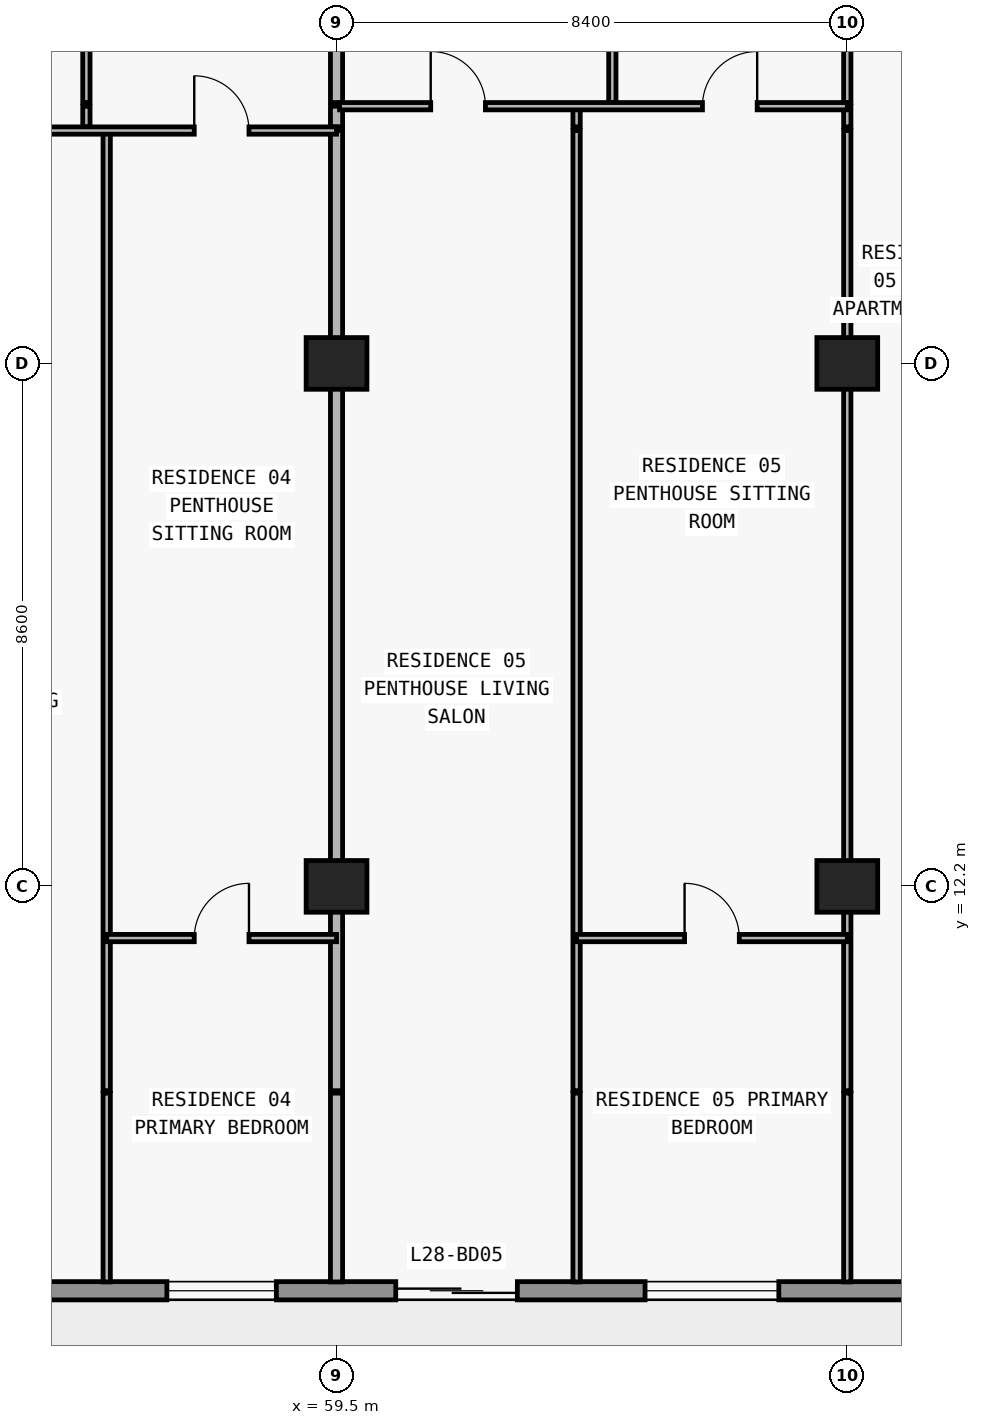
"""IFC4 building model, lengths in metres.
Left out: names, types, materials, properties, quantities, classifications, styles, units other than length and angle.
Written with IfcOpenShell. Run it as: python <this file> out.ifc"""

import sys

from ifc_helpers import new_model, si_unit, direction, frame, frame_2d, origin, origin_2d, place, context, subcontext, project, spatial, rectangle, extrude, element, fill, save


model = new_model("IFC4")
c1 = context("Model", 3, precision=1e-05, world=origin(), true_north=direction((0.0, 1.0)))
c2 = subcontext(c1, "Body", "Model", "MODEL_VIEW")
j1 = project(units=[si_unit("LENGTHUNIT", "METRE"), si_unit("PLANEANGLEUNIT", "RADIAN")], contexts=[c1])
p1 = place(None, origin())
s1 = spatial("IfcSite", under=j1, at=p1, CompositionType="ELEMENT")
p2 = place(p1, origin())
s2 = spatial("IfcBuilding", under=s1, at=p2, CompositionType="ELEMENT")
p3 = place(p2, frame((0.0, 0.0, 105.9)))
s3 = spatial("IfcBuildingStorey", under=s2, at=p3, CompositionType="ELEMENT", Elevation=105.9)
for number, where, z_axis, x_axis in (
    (1, (59.5, 12.2, 0.0), (0.0, 0.0, 1.0), (1.0, 0.0, 0.0)),
    (2, (67.9, 12.2, 0.0), (0.0, 0.0, 1.0), (1.0, 0.0, 0.0)),
    (3, (59.5, 20.8, 0.0), (0.0, 0.0, 1.0), (1.0, 0.0, 0.0)),
    (4, (67.9, 20.8, 0.0), (0.0, 0.0, 1.0), (1.0, 0.0, 0.0)),
):
    element("IfcColumn", number, at=place(p3, frame(where, z_axis=z_axis, x_axis=x_axis)), inside=s3, PredefinedType="COLUMN", context=c2, shape_type="SweptSolid", body=[
        extrude(rectangle(XDim=1.0, YDim=0.85, at=origin_2d()), origin(), (0.0, 0.0, 1.0), 3.05),
    ])
p4 = place(p3, frame((70.1, 5.55, 0.0), z_axis=(0.0, 0.0, 1.0), x_axis=(-1.0, 0.0, 0.0)))
e5 = element("IfcWall", 5, at=p4, inside=s3, PredefinedType="STANDARD", context=c2, shape_type="SweptSolid", body=[
    extrude(rectangle(XDim=62.4, YDim=0.3, at=frame_2d((31.2, 0.0))), origin(), (0.0, 0.0, 1.0), 3.05),
])
p5 = place(p4, frame((57.226, 0.0, 0.0)))
e6 = element("IfcOpeningElement", 6, at=p5, cuts=e5, PredefinedType="OPENING", context=c2, shape_type="SweptSolid", body=[
    extrude(rectangle(XDim=2.0, YDim=2.3, at=frame_2d((1.0, 1.15))), frame((0.0, 0.16, 0.0), z_axis=(0.0, -1.0, 0.0), x_axis=(1.0, 0.0, 0.0)), (0.0, 0.0, 1.0), 0.32),
])
p6 = place(p4, frame((52.926, 0.0, 0.85)))
e7 = element("IfcOpeningElement", 7, at=p6, cuts=e5, PredefinedType="OPENING", context=c2, shape_type="SweptSolid", body=[
    extrude(rectangle(XDim=2.2, YDim=1.55, at=frame_2d((1.1, 0.775))), frame((0.0, 0.16, 0.0), z_axis=(0.0, -1.0, 0.0), x_axis=(1.0, 0.0, 0.0)), (0.0, 0.0, 1.0), 0.32),
])
p7 = place(p4, frame((48.49, 0.0, 0.0)))
e8 = element("IfcOpeningElement", 8, at=p7, cuts=e5, PredefinedType="OPENING", context=c2, shape_type="SweptSolid", body=[
    extrude(rectangle(XDim=2.0, YDim=2.3, at=frame_2d((1.0, 1.15))), frame((0.0, 0.16, 0.0), z_axis=(0.0, -1.0, 0.0), x_axis=(1.0, 0.0, 0.0)), (0.0, 0.0, 1.0), 0.32),
])
p8 = place(p4, frame((44.39, 0.0, 0.85)))
e9 = element("IfcOpeningElement", 9, at=p8, cuts=e5, PredefinedType="OPENING", context=c2, shape_type="SweptSolid", body=[
    extrude(rectangle(XDim=1.8, YDim=1.55, at=frame_2d((0.9, 0.775))), frame((0.0, 0.16, 0.0), z_axis=(0.0, -1.0, 0.0), x_axis=(1.0, 0.0, 0.0)), (0.0, 0.0, 1.0), 0.32),
])
p9 = place(p4, frame((40.49, 0.0, 0.0)))
e10 = element("IfcOpeningElement", 10, at=p9, cuts=e5, PredefinedType="OPENING", context=c2, shape_type="SweptSolid", body=[
    extrude(rectangle(XDim=2.0, YDim=2.3, at=frame_2d((1.0, 1.15))), frame((0.0, 0.16, 0.0), z_axis=(0.0, -1.0, 0.0), x_axis=(1.0, 0.0, 0.0)), (0.0, 0.0, 1.0), 0.32),
])
p10 = place(p4, frame((35.81, 0.0, 0.65)))
e11 = element("IfcOpeningElement", 11, at=p10, cuts=e5, PredefinedType="OPENING", context=c2, shape_type="SweptSolid", body=[
    extrude(rectangle(XDim=2.6, YDim=1.85, at=frame_2d((1.3, 0.925))), frame((0.0, 0.16, 0.0), z_axis=(0.0, -1.0, 0.0), x_axis=(1.0, 0.0, 0.0)), (0.0, 0.0, 1.0), 0.32),
])
p11 = place(p4, frame((30.1, 0.0, 0.85)))
e12 = element("IfcOpeningElement", 12, at=p11, cuts=e5, PredefinedType="OPENING", context=c2, shape_type="SweptSolid", body=[
    extrude(rectangle(XDim=2.2, YDim=1.55, at=frame_2d((1.1, 0.775))), frame((0.0, 0.16, 0.0), z_axis=(0.0, -1.0, 0.0), x_axis=(1.0, 0.0, 0.0)), (0.0, 0.0, 1.0), 0.32),
])
p12 = place(p4, frame((22.1, 0.0, 0.85)))
e13 = element("IfcOpeningElement", 13, at=p12, cuts=e5, PredefinedType="OPENING", context=c2, shape_type="SweptSolid", body=[
    extrude(rectangle(XDim=2.2, YDim=1.55, at=frame_2d((1.1, 0.775))), frame((0.0, 0.16, 0.0), z_axis=(0.0, -1.0, 0.0), x_axis=(1.0, 0.0, 0.0)), (0.0, 0.0, 1.0), 0.32),
])
p13 = place(p4, frame((15.69, 0.0, 0.0)))
e14 = element("IfcOpeningElement", 14, at=p13, cuts=e5, PredefinedType="OPENING", context=c2, shape_type="SweptSolid", body=[
    extrude(rectangle(XDim=2.0, YDim=2.3, at=frame_2d((1.0, 1.15))), frame((0.0, 0.16, 0.0), z_axis=(0.0, -1.0, 0.0), x_axis=(1.0, 0.0, 0.0)), (0.0, 0.0, 1.0), 0.32),
])
p14 = place(p4, frame((11.59, 0.0, 0.85)))
e15 = element("IfcOpeningElement", 15, at=p14, cuts=e5, PredefinedType="OPENING", context=c2, shape_type="SweptSolid", body=[
    extrude(rectangle(XDim=1.8, YDim=1.55, at=frame_2d((0.9, 0.775))), frame((0.0, 0.16, 0.0), z_axis=(0.0, -1.0, 0.0), x_axis=(1.0, 0.0, 0.0)), (0.0, 0.0, 1.0), 0.32),
])
p15 = place(p4, frame((7.626, 0.0, 0.0)))
e16 = element("IfcOpeningElement", 16, at=p15, cuts=e5, PredefinedType="OPENING", context=c2, shape_type="SweptSolid", body=[
    extrude(rectangle(XDim=2.0, YDim=2.3, at=frame_2d((1.0, 1.15))), frame((0.0, 0.16, 0.0), z_axis=(0.0, -1.0, 0.0), x_axis=(1.0, 0.0, 0.0)), (0.0, 0.0, 1.0), 0.32),
])
p16 = place(p4, frame((3.326, 0.0, 0.85)))
e17 = element("IfcOpeningElement", 17, at=p16, cuts=e5, PredefinedType="OPENING", context=c2, shape_type="SweptSolid", body=[
    extrude(rectangle(XDim=2.2, YDim=1.55, at=frame_2d((1.1, 0.775))), frame((0.0, 0.16, 0.0), z_axis=(0.0, -1.0, 0.0), x_axis=(1.0, 0.0, 0.0)), (0.0, 0.0, 1.0), 0.32),
])
p17 = place(p3, frame((55.386, 24.69, 0.0), z_axis=(0.0, 0.0, 1.0), x_axis=(0.0, 1.0, 0.0)))
e18 = element("IfcWall", 18, at=p17, inside=s3, PredefinedType="PARTITIONING", context=c2, shape_type="SweptSolid", body=[
    extrude(rectangle(XDim=0.34, YDim=0.12, at=frame_2d((0.17, 0.0))), origin(), (0.0, 0.0, 1.0), 3.05),
])
p18 = place(p3, frame((55.386, 25.09, 0.0), z_axis=(0.0, 0.0, 1.0), x_axis=(0.0, 1.0, 0.0)))
e19 = element("IfcWall", 19, at=p18, inside=s3, PredefinedType="PARTITIONING", context=c2, shape_type="SweptSolid", body=[
    extrude(rectangle(XDim=4.69, YDim=0.12, at=frame_2d((2.345, 0.0))), origin(), (0.0, 0.0, 1.0), 2.725),
])
p19 = place(p18, frame((1.895, 0.0, 0.0)))
e20 = element("IfcOpeningElement", 20, at=p19, cuts=e19, PredefinedType="OPENING", context=c2, shape_type="SweptSolid", body=[
    extrude(rectangle(XDim=0.9, YDim=2.15, at=frame_2d((0.45, 1.075))), frame((0.0, 0.07, 0.0), z_axis=(0.0, -1.0, 0.0), x_axis=(1.0, 0.0, 0.0)), (0.0, 0.0, 1.0), 0.14),
])
p20 = place(p3, frame((55.72, 5.695, 0.0), z_axis=(0.0, 0.0, 1.0), x_axis=(0.0, 1.0, 0.0)))
e21 = element("IfcWall", 21, at=p20, inside=s3, PredefinedType="PARTITIONING", context=c2, shape_type="SweptSolid", body=[
    extrude(rectangle(XDim=3.105, YDim=0.12, at=frame_2d((1.552, 0.0))), origin(), (0.0, 0.0, 1.0), 3.05),
])
p21 = place(p3, frame((55.72, 8.84, 0.0), z_axis=(0.0, 0.0, 1.0), x_axis=(0.0, 1.0, 0.0)))
e22 = element("IfcWall", 22, at=p21, inside=s3, PredefinedType="PARTITIONING", context=c2, shape_type="SweptSolid", body=[
    extrude(rectangle(XDim=15.79, YDim=0.12, at=frame_2d((7.895, 0.0))), origin(), (0.0, 0.0, 1.0), 3.05),
])
p22 = place(p3, frame((59.5, 5.695, 0.0), z_axis=(0.0, 0.0, 1.0), x_axis=(0.0, 1.0, 0.0)))
e23 = element("IfcWall", 23, at=p22, inside=s3, PredefinedType="PARTITIONING", context=c2, shape_type="SweptSolid", body=[
    extrude(rectangle(XDim=3.105, YDim=0.2, at=frame_2d((1.552, 0.0))), origin(), (0.0, 0.0, 1.0), 3.05),
])
p23 = place(p3, frame((59.5, 8.84, 0.0), z_axis=(0.0, 0.0, 1.0), x_axis=(0.0, 1.0, 0.0)))
e24 = element("IfcWall", 24, at=p23, inside=s3, PredefinedType="PARTITIONING", context=c2, shape_type="SweptSolid", body=[
    extrude(rectangle(XDim=15.79, YDim=0.2, at=frame_2d((7.895, 0.0))), origin(), (0.0, 0.0, 1.0), 2.174),
])
p24 = place(p3, frame((59.5, 24.69, 0.0), z_axis=(0.0, 0.0, 1.0), x_axis=(0.0, 1.0, 0.0)))
e25 = element("IfcWall", 25, at=p24, inside=s3, PredefinedType="PARTITIONING", context=c2, shape_type="SweptSolid", body=[
    extrude(rectangle(XDim=0.34, YDim=0.2, at=frame_2d((0.17, 0.0))), origin(), (0.0, 0.0, 1.0), 2.174),
])
p25 = place(p3, frame((59.5, 25.09, 0.0), z_axis=(0.0, 0.0, 1.0), x_axis=(0.0, 1.0, 0.0)))
e26 = element("IfcWall", 26, at=p25, inside=s3, PredefinedType="PARTITIONING", context=c2, shape_type="SweptSolid", body=[
    extrude(rectangle(XDim=4.69, YDim=0.2, at=frame_2d((2.345, 0.0))), origin(), (0.0, 0.0, 1.0), 2.174),
])
p26 = place(p3, frame((63.448, 5.695, 0.0), z_axis=(0.0, 0.0, 1.0), x_axis=(0.0, 1.0, 0.0)))
e27 = element("IfcWall", 27, at=p26, inside=s3, PredefinedType="PARTITIONING", context=c2, shape_type="SweptSolid", body=[
    extrude(rectangle(XDim=3.105, YDim=0.12, at=frame_2d((1.552, 0.0))), origin(), (0.0, 0.0, 1.0), 3.05),
])
p27 = place(p3, frame((63.448, 8.84, 0.0), z_axis=(0.0, 0.0, 1.0), x_axis=(0.0, 1.0, 0.0)))
e28 = element("IfcWall", 28, at=p27, inside=s3, PredefinedType="PARTITIONING", context=c2, shape_type="SweptSolid", body=[
    extrude(rectangle(XDim=15.79, YDim=0.12, at=frame_2d((7.895, 0.0))), origin(), (0.0, 0.0, 1.0), 3.05),
])
p28 = place(p3, frame((63.448, 24.69, 0.0), z_axis=(0.0, 0.0, 1.0), x_axis=(0.0, 1.0, 0.0)))
e29 = element("IfcWall", 29, at=p28, inside=s3, PredefinedType="PARTITIONING", context=c2, shape_type="SweptSolid", body=[
    extrude(rectangle(XDim=0.34, YDim=0.12, at=frame_2d((0.17, 0.0))), origin(), (0.0, 0.0, 1.0), 3.05),
])
p29 = place(p3, frame((64.036, 25.09, 0.0), z_axis=(0.0, 0.0, 1.0), x_axis=(0.0, 1.0, 0.0)))
e30 = element("IfcWall", 30, at=p29, inside=s3, PredefinedType="PARTITIONING", context=c2, shape_type="SweptSolid", body=[
    extrude(rectangle(XDim=4.69, YDim=0.12, at=frame_2d((2.345, 0.0))), origin(), (0.0, 0.0, 1.0), 3.05),
])
p30 = place(p29, frame((1.895, 0.0, 0.0)))
e31 = element("IfcOpeningElement", 31, at=p30, cuts=e30, PredefinedType="OPENING", context=c2, shape_type="SweptSolid", body=[
    extrude(rectangle(XDim=0.9, YDim=2.15, at=frame_2d((0.45, 1.075))), frame((0.0, 0.07, 0.0), z_axis=(0.0, -1.0, 0.0), x_axis=(1.0, 0.0, 0.0)), (0.0, 0.0, 1.0), 0.14),
])
p31 = place(p3, frame((67.9, 5.695, 0.0), z_axis=(0.0, 0.0, 1.0), x_axis=(0.0, 1.0, 0.0)))
e32 = element("IfcWall", 32, at=p31, inside=s3, PredefinedType="PARTITIONING", context=c2, shape_type="SweptSolid", body=[
    extrude(rectangle(XDim=3.105, YDim=0.12, at=frame_2d((1.552, 0.0))), origin(), (0.0, 0.0, 1.0), 3.05),
])
p32 = place(p3, frame((67.9, 8.84, 0.0), z_axis=(0.0, 0.0, 1.0), x_axis=(0.0, 1.0, 0.0)))
e33 = element("IfcWall", 33, at=p32, inside=s3, PredefinedType="PARTITIONING", context=c2, shape_type="SweptSolid", body=[
    extrude(rectangle(XDim=15.79, YDim=0.12, at=frame_2d((7.895, 0.0))), origin(), (0.0, 0.0, 1.0), 2.174),
])
p33 = place(p3, frame((67.9, 24.69, 0.0), z_axis=(0.0, 0.0, 1.0), x_axis=(0.0, 1.0, 0.0)))
e34 = element("IfcWall", 34, at=p33, inside=s3, PredefinedType="PARTITIONING", context=c2, shape_type="SweptSolid", body=[
    extrude(rectangle(XDim=0.34, YDim=0.12, at=frame_2d((0.17, 0.0))), origin(), (0.0, 0.0, 1.0), 2.174),
])
p34 = place(p3, frame((67.9, 25.09, 0.0), z_axis=(0.0, 0.0, 1.0), x_axis=(0.0, 1.0, 0.0)))
e35 = element("IfcWall", 35, at=p34, inside=s3, PredefinedType="PARTITIONING", context=c2, shape_type="SweptSolid", body=[
    extrude(rectangle(XDim=4.69, YDim=0.12, at=frame_2d((2.345, 0.0))), origin(), (0.0, 0.0, 1.0), 2.174),
])
p35 = place(p34, frame((1.895, 0.0, 0.0)))
e36 = element("IfcOpeningElement", 36, at=p35, cuts=e35, PredefinedType="OPENING", context=c2, shape_type="SweptSolid", body=[
    extrude(rectangle(XDim=0.9, YDim=2.124, at=frame_2d((0.45, 1.062))), frame((0.0, 0.07, 0.0), z_axis=(0.0, -1.0, 0.0), x_axis=(1.0, 0.0, 0.0)), (0.0, 0.0, 1.0), 0.14),
])
p36 = place(p3, frame((55.72, 11.35, 0.0), z_axis=(0.0, 0.0, 1.0), x_axis=(1.0, 0.0, 0.0)))
e37 = element("IfcWall", 37, at=p36, inside=s3, PredefinedType="PARTITIONING", context=c2, shape_type="SweptSolid", body=[
    extrude(rectangle(XDim=3.78, YDim=0.12, at=frame_2d((1.89, 0.0))), origin(), (0.0, 0.0, 1.0), 3.05),
])
p37 = place(p36, frame((1.44, 0.0, 0.0)))
e38 = element("IfcOpeningElement", 38, at=p37, cuts=e37, PredefinedType="OPENING", context=c2, shape_type="SweptSolid", body=[
    extrude(rectangle(XDim=0.9, YDim=2.15, at=frame_2d((0.45, 1.075))), frame((0.0, 0.07, 0.0), z_axis=(0.0, -1.0, 0.0), x_axis=(1.0, 0.0, 0.0)), (0.0, 0.0, 1.0), 0.14),
])
p38 = place(p3, frame((63.448, 11.35, 0.0), z_axis=(0.0, 0.0, 1.0), x_axis=(1.0, 0.0, 0.0)))
e39 = element("IfcWall", 39, at=p38, inside=s3, PredefinedType="PARTITIONING", context=c2, shape_type="SweptSolid", body=[
    extrude(rectangle(XDim=4.452, YDim=0.12, at=frame_2d((2.226, 0.0))), origin(), (0.0, 0.0, 1.0), 3.05),
])
p39 = place(p38, frame((1.776, 0.0, 0.0)))
e40 = element("IfcOpeningElement", 40, at=p39, cuts=e39, PredefinedType="OPENING", context=c2, shape_type="SweptSolid", body=[
    extrude(rectangle(XDim=0.9, YDim=2.15, at=frame_2d((0.45, 1.075))), frame((0.0, 0.07, 0.0), z_axis=(0.0, -1.0, 0.0), x_axis=(1.0, 0.0, 0.0)), (0.0, 0.0, 1.0), 0.14),
])
p40 = place(p3, frame((51.32, 24.63, 0.0), z_axis=(0.0, 0.0, 1.0), x_axis=(1.0, 0.0, 0.0)))
e41 = element("IfcWall", 41, at=p40, inside=s3, PredefinedType="PARTITIONING", context=c2, shape_type="SweptSolid", body=[
    extrude(rectangle(XDim=8.18, YDim=0.12, at=frame_2d((4.09, 0.0))), origin(), (0.0, 0.0, 1.0), 3.05),
])
p41 = place(p40, frame((1.583, 0.0, 0.0)))
e42 = element("IfcOpeningElement", 42, at=p41, cuts=e41, PredefinedType="OPENING", context=c2, shape_type="SweptSolid", body=[
    extrude(rectangle(XDim=0.9, YDim=2.15, at=frame_2d((0.45, 1.075))), frame((0.0, 0.07, 0.0), z_axis=(0.0, -1.0, 0.0), x_axis=(1.0, 0.0, 0.0)), (0.0, 0.0, 1.0), 0.14),
])
p42 = place(p40, frame((5.84, 0.0, 0.0)))
e43 = element("IfcOpeningElement", 43, at=p42, cuts=e41, PredefinedType="OPENING", context=c2, shape_type="SweptSolid", body=[
    extrude(rectangle(XDim=0.9, YDim=2.15, at=frame_2d((0.45, 1.075))), frame((0.0, 0.07, 0.0), z_axis=(0.0, -1.0, 0.0), x_axis=(1.0, 0.0, 0.0)), (0.0, 0.0, 1.0), 0.14),
])
p43 = place(p3, frame((59.55, 25.03, 0.0), z_axis=(0.0, 0.0, 1.0), x_axis=(1.0, 0.0, 0.0)))
e44 = element("IfcWall", 44, at=p43, inside=s3, PredefinedType="PARTITIONING", context=c2, shape_type="SweptSolid", body=[
    extrude(rectangle(XDim=8.35, YDim=0.12, at=frame_2d((4.175, 0.0))), origin(), (0.0, 0.0, 1.0), 3.05),
])
p44 = place(p43, frame((1.499, 0.0, 0.0)))
e45 = element("IfcOpeningElement", 45, at=p44, cuts=e44, PredefinedType="OPENING", context=c2, shape_type="SweptSolid", body=[
    extrude(rectangle(XDim=0.9, YDim=2.15, at=frame_2d((0.45, 1.075))), frame((0.0, 0.07, 0.0), z_axis=(0.0, -1.0, 0.0), x_axis=(1.0, 0.0, 0.0)), (0.0, 0.0, 1.0), 0.14),
])
p45 = place(p43, frame((5.968, 0.0, 0.0)))
e46 = element("IfcOpeningElement", 46, at=p45, cuts=e44, PredefinedType="OPENING", context=c2, shape_type="SweptSolid", body=[
    extrude(rectangle(XDim=0.9, YDim=2.15, at=frame_2d((0.45, 1.075))), frame((0.0, 0.07, 0.0), z_axis=(0.0, -1.0, 0.0), x_axis=(1.0, 0.0, 0.0)), (0.0, 0.0, 1.0), 0.14),
])
p46 = place(p14, origin())
e47 = element("IfcWindow", 47, at=p46, inside=s3, PartitioningType="SINGLE_PANEL", PredefinedType="WINDOW", context=c2, shape_type="SweptSolid", body=[
    extrude(rectangle(XDim=1.8, YDim=1.55, at=frame_2d((0.9, 0.775))), frame((0.0, 0.03, 0.0), z_axis=(0.0, -1.0, 0.0), x_axis=(1.0, 0.0, 0.0)), (0.0, 0.0, 1.0), 0.06),
])
fill(e15, e47)
p47 = place(p15, origin())
e48 = element("IfcDoor", 48, at=p47, inside=s3, OperationType="DOUBLE_DOOR_SLIDING", PredefinedType="DOOR", context=c2, shape_type="SweptSolid", body=[
    extrude(rectangle(XDim=2.0, YDim=2.3, at=frame_2d((1.0, 1.15))), frame((0.0, 0.025, 0.0), z_axis=(0.0, -1.0, 0.0), x_axis=(1.0, 0.0, 0.0)), (0.0, 0.0, 1.0), 0.05),
])
fill(e16, e48)
p48 = place(p16, origin())
e49 = element("IfcWindow", 49, at=p48, inside=s3, PartitioningType="SINGLE_PANEL", PredefinedType="WINDOW", context=c2, shape_type="SweptSolid", body=[
    extrude(rectangle(XDim=2.2, YDim=1.55, at=frame_2d((1.1, 0.775))), frame((0.0, 0.03, 0.0), z_axis=(0.0, -1.0, 0.0), x_axis=(1.0, 0.0, 0.0)), (0.0, 0.0, 1.0), 0.06),
])
fill(e17, e49)
p49 = place(p42, origin())
e50 = element("IfcDoor", 50, at=p49, inside=s3, OperationType="SINGLE_SWING_LEFT", PredefinedType="DOOR", context=c2, shape_type="SweptSolid", body=[
    extrude(rectangle(XDim=0.9, YDim=2.15, at=frame_2d((0.45, 1.075))), frame((0.0, 0.025, 0.0), z_axis=(0.0, -1.0, 0.0), x_axis=(1.0, 0.0, 0.0)), (0.0, 0.0, 1.0), 0.05),
])
fill(e43, e50)
p50 = place(p37, origin())
e51 = element("IfcDoor", 51, at=p50, inside=s3, OperationType="SINGLE_SWING_RIGHT", PredefinedType="DOOR", context=c2, shape_type="SweptSolid", body=[
    extrude(rectangle(XDim=0.9, YDim=2.15, at=frame_2d((0.45, 1.075))), frame((0.0, 0.025, 0.0), z_axis=(0.0, -1.0, 0.0), x_axis=(1.0, 0.0, 0.0)), (0.0, 0.0, 1.0), 0.05),
])
fill(e38, e51)
p51 = place(p44, origin())
e52 = element("IfcDoor", 52, at=p51, inside=s3, OperationType="SINGLE_SWING_LEFT", PredefinedType="DOOR", context=c2, shape_type="SweptSolid", body=[
    extrude(rectangle(XDim=0.9, YDim=2.15, at=frame_2d((0.45, 1.075))), frame((0.0, 0.025, 0.0), z_axis=(0.0, -1.0, 0.0), x_axis=(1.0, 0.0, 0.0)), (0.0, 0.0, 1.0), 0.05),
])
fill(e45, e52)
p52 = place(p45, origin())
e53 = element("IfcDoor", 53, at=p52, inside=s3, OperationType="SINGLE_SWING_RIGHT", PredefinedType="DOOR", context=c2, shape_type="SweptSolid", body=[
    extrude(rectangle(XDim=0.9, YDim=2.15, at=frame_2d((0.45, 1.075))), frame((0.0, 0.025, 0.0), z_axis=(0.0, -1.0, 0.0), x_axis=(1.0, 0.0, 0.0)), (0.0, 0.0, 1.0), 0.05),
])
fill(e46, e53)
p53 = place(p39, origin())
e54 = element("IfcDoor", 54, at=p53, inside=s3, OperationType="SINGLE_SWING_LEFT", PredefinedType="DOOR", context=c2, shape_type="SweptSolid", body=[
    extrude(rectangle(XDim=0.9, YDim=2.15, at=frame_2d((0.45, 1.075))), frame((0.0, 0.025, 0.0), z_axis=(0.0, -1.0, 0.0), x_axis=(1.0, 0.0, 0.0)), (0.0, 0.0, 1.0), 0.05),
])
fill(e40, e54)
save(model, sys.argv[1])
